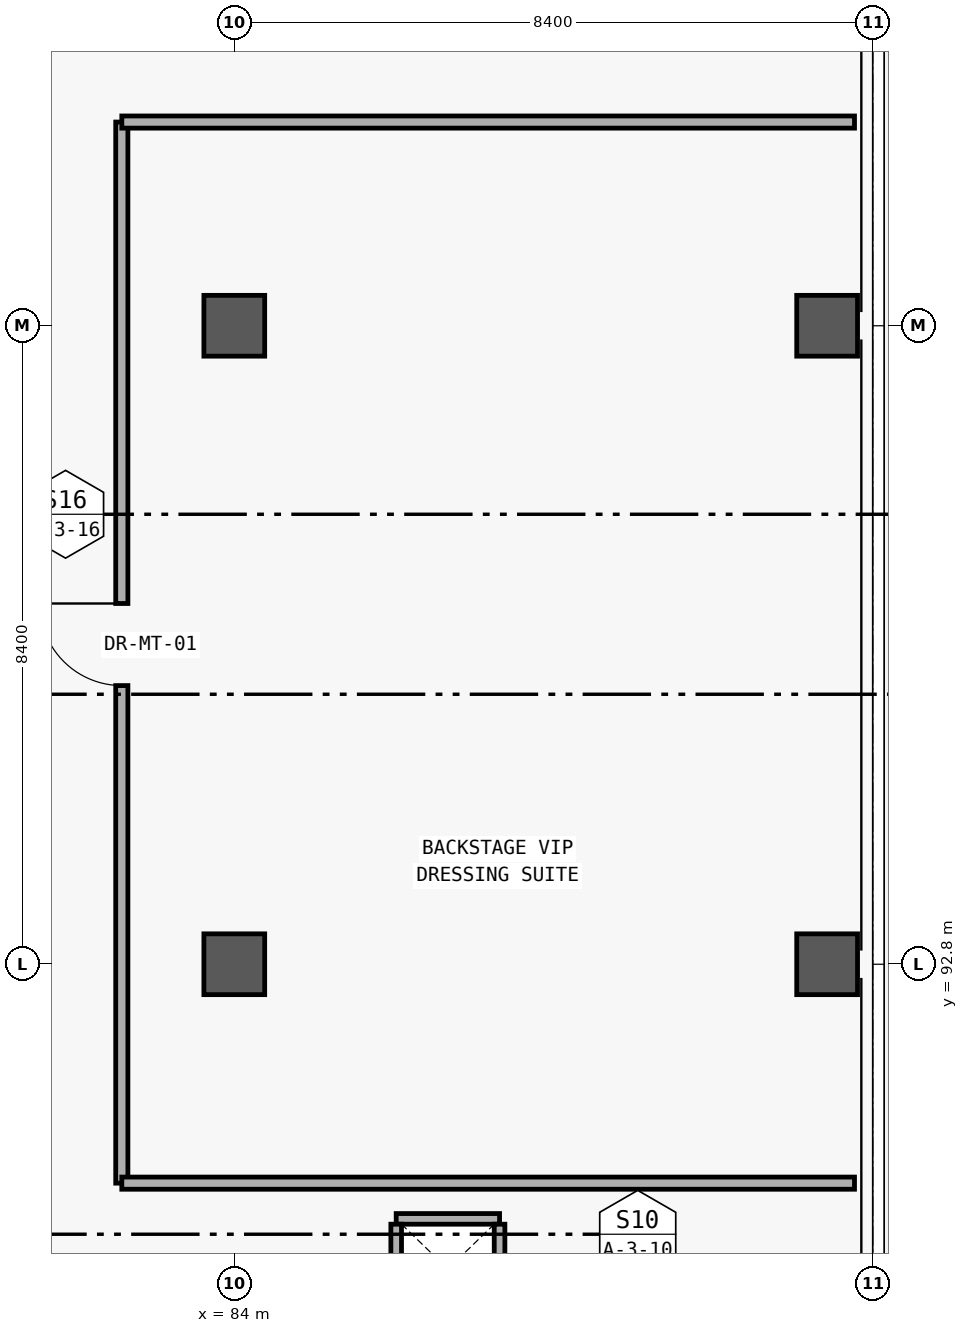
"""IFC4 building model, lengths in metres.
Left out: names, types, materials, properties, quantities, classifications, styles, units other than length and angle.
Written with IfcOpenShell. Run it as: python <this file> out.ifc"""

import sys

from ifc_helpers import new_model, si_unit, direction, frame, frame_2d, origin, origin_2d, place, context, subcontext, project, spatial, rectangle, extrude, element, fill, save


model = new_model("IFC4")
c1 = context("Model", 3, precision=1e-05, world=origin(), true_north=direction((0.0, 1.0)))
c2 = subcontext(c1, "Body", "Model", "MODEL_VIEW")
j1 = project(units=[si_unit("LENGTHUNIT", "METRE"), si_unit("PLANEANGLEUNIT", "RADIAN")], contexts=[c1])
p1 = place(None, origin())
s1 = spatial("IfcSite", under=j1, at=p1, CompositionType="ELEMENT")
p2 = place(p1, origin())
s2 = spatial("IfcBuilding", under=s1, at=p2, CompositionType="ELEMENT")
p3 = place(p2, origin())
s3 = spatial("IfcBuildingStorey", under=s2, at=p3, CompositionType="ELEMENT", Elevation=0.0)
for number, where, z_axis, x_axis in (
    (1, (84.0, 92.8, 0.0), (0.0, 0.0, 1.0), (1.0, 0.0, 0.0)),
    (2, (84.0, 101.2, 0.0), (0.0, 0.0, 1.0), (1.0, 0.0, 0.0)),
    (3, (91.8, 92.8, 0.0), (0.0, 0.0, 1.0), (1.0, 0.0, 0.0)),
    (4, (91.8, 101.2, 0.0), (0.0, 0.0, 1.0), (1.0, 0.0, 0.0)),
):
    element("IfcColumn", number, at=place(p3, frame(where, z_axis=z_axis, x_axis=x_axis)), inside=s3, PredefinedType="COLUMN", context=c2, shape_type="SweptSolid", body=[
        extrude(rectangle(XDim=0.8, YDim=0.8, at=origin_2d()), origin(), (0.0, 0.0, 1.0), 5.4),
    ])
p4 = place(p3, frame((82.52, 89.92, 0.0), z_axis=(0.0, 0.0, 1.0), x_axis=(0.0, 1.0, 0.0)))
e5 = element("IfcWall", 5, at=p4, inside=s3, PredefinedType="PARTITIONING", context=c2, shape_type="SweptSolid", body=[
    extrude(rectangle(XDim=13.96, YDim=0.16, at=frame_2d((6.98, 0.0))), origin(), (0.0, 0.0, 1.0), 4.18),
])
p5 = place(p4, frame((6.546, 0.0, 0.0)))
e6 = element("IfcOpeningElement", 6, at=p5, cuts=e5, PredefinedType="OPENING", context=c2, shape_type="SweptSolid", body=[
    extrude(rectangle(XDim=1.08, YDim=2.25, at=frame_2d((0.54, 1.125))), frame((0.0, 0.09, 0.0), z_axis=(0.0, -1.0, 0.0), x_axis=(1.0, 0.0, 0.0)), (0.0, 0.0, 1.0), 0.18),
])
for number, where, z_axis, x_axis in (
    (7, (82.52, 89.92, 0.0), (0.0, 0.0, 1.0), (1.0, 0.0, 0.0)),
    (8, (82.52, 103.88, 0.0), (0.0, 0.0, 1.0), (1.0, 0.0, 0.0)),
):
    element("IfcWall", number, at=place(p3, frame(where, z_axis=z_axis, x_axis=x_axis)), inside=s3, PredefinedType="PARTITIONING", context=c2, shape_type="SweptSolid", body=[
        extrude(rectangle(XDim=9.64, YDim=0.16, at=frame_2d((4.82, 0.0))), origin(), (0.0, 0.0, 1.0), 4.18),
    ])
p6 = place(p3, frame((87.49, 89.45, 0.0), z_axis=(0.0, 0.0, 1.0), x_axis=(-1.0, 0.0, 0.0)))
e9 = element("IfcWall", 9, at=p6, inside=s3, PredefinedType="PARTITIONING", context=c2, shape_type="SweptSolid", body=[
    extrude(rectangle(XDim=1.36, YDim=0.14, at=frame_2d((0.68, 0.0))), origin(), (0.0, 0.0, 1.0), 4.2),
])
for number, where, z_axis, x_axis in (
    (10, (86.13, 89.38, 0.0), (0.0, 0.0, 1.0), (0.0, -1.0, 0.0)),
    (11, (87.49, 88.2, 0.0), (0.0, 0.0, 1.0), (0.0, 1.0, 0.0)),
):
    element("IfcWall", number, at=place(p3, frame(where, z_axis=z_axis, x_axis=x_axis)), inside=s3, PredefinedType="PARTITIONING", context=c2, shape_type="SweptSolid", body=[
        extrude(rectangle(XDim=1.18, YDim=0.14, at=frame_2d((0.59, 0.0))), origin(), (0.0, 0.0, 1.0), 4.2),
    ])
p7 = place(p5, origin())
e12 = element("IfcDoor", 12, at=p7, inside=s3, OperationType="SINGLE_SWING_RIGHT", PredefinedType="DOOR", context=c2, shape_type="SweptSolid", body=[
    extrude(rectangle(XDim=1.08, YDim=2.25, at=frame_2d((0.54, 1.125))), frame((0.0, 0.025, 0.0), z_axis=(0.0, -1.0, 0.0), x_axis=(1.0, 0.0, 0.0)), (0.0, 0.0, 1.0), 0.05),
])
fill(e6, e12)
save(model, sys.argv[1])
